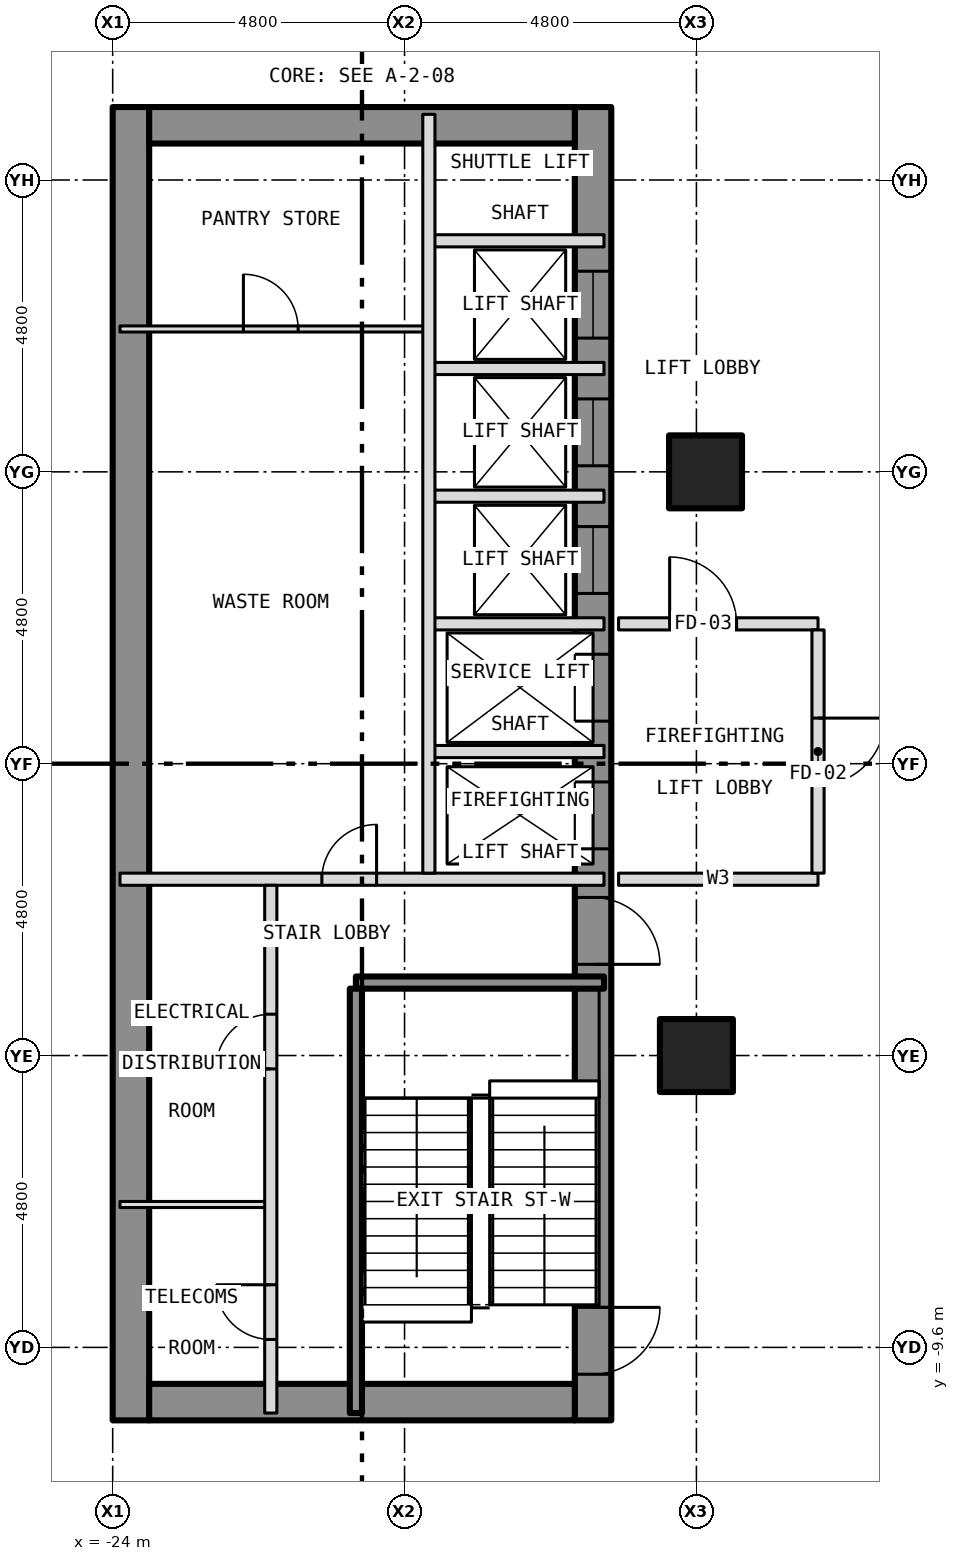
"""IFC4 building model, lengths in metres.
Left out: names, types, materials, properties, quantities, classifications, styles, units other than length and angle.
Written with IfcOpenShell. Run it as: python <this file> out.ifc"""

import sys

from ifc_helpers import new_model, si_unit, direction, frame, frame_2d, origin, origin_2d, place, context, subcontext, project, spatial, rectangle, hollow_rectangle, extrude, element, fill, save


model = new_model("IFC4")
c1 = context("Model", 3, precision=1e-05, world=origin(), true_north=direction((0.0, 1.0)))
c2 = subcontext(c1, "Body", "Model", "MODEL_VIEW")
j1 = project(units=[si_unit("LENGTHUNIT", "METRE"), si_unit("PLANEANGLEUNIT", "RADIAN")], contexts=[c1])
p1 = place(None, origin())
s1 = spatial("IfcSite", under=j1, at=p1, CompositionType="ELEMENT")
p2 = place(p1, origin())
s2 = spatial("IfcBuilding", under=s1, at=p2, CompositionType="ELEMENT")
p3 = place(p2, frame((0.0, 0.0, 29.0)))
s3 = spatial("IfcBuildingStorey", under=s2, at=p3, CompositionType="ELEMENT", Elevation=29.0)
for number, where, z_axis, x_axis in (
    (1, (-14.4, -4.8, -0.2), (0.0, 0.0, 1.0), (1.0, 0.0, 0.0)),
    (2, (-14.25, 4.8, -0.2), (0.0, 0.0, 1.0), (1.0, 0.0, 0.0)),
):
    element("IfcColumn", number, at=place(p3, frame(where, z_axis=z_axis, x_axis=x_axis)), inside=s3, PredefinedType="COLUMN", context=c2, shape_type="SweptSolid", body=[
        extrude(hollow_rectangle(XDim=1.2, YDim=1.2, WallThickness=0.07, at=origin_2d()), origin(), (0.0, 0.0, 1.0), 4.4),
    ])
p4 = place(p3, frame((-16.1, -10.8, 0.0), z_axis=(0.0, 0.0, 1.0), x_axis=(0.0, 1.0, 0.0)))
e3 = element("IfcWall", 3, at=p4, inside=s3, PredefinedType="SHEAR", context=c2, shape_type="SweptSolid", body=[
    extrude(rectangle(XDim=21.6, YDim=0.6, at=frame_2d((10.8, 0.0))), origin(), (0.0, 0.0, 1.0), 3.9),
])
p5 = place(p4, frame((9.4, 0.0, 0.0)))
e4 = element("IfcOpeningElement", 4, at=p5, cuts=e3, PredefinedType="OPENING", context=c2, shape_type="SweptSolid", body=[
    extrude(rectangle(XDim=1.1, YDim=2.1, at=frame_2d((0.55, 1.05))), frame((0.0, 0.312, 0.0), z_axis=(0.0, -1.0, 0.0), x_axis=(1.0, 0.0, 0.0)), (0.0, 0.0, 1.0), 0.624),
])
p6 = place(p4, frame((11.5, 0.0, 0.0)))
e5 = element("IfcOpeningElement", 5, at=p6, cuts=e3, PredefinedType="OPENING", context=c2, shape_type="SweptSolid", body=[
    extrude(rectangle(XDim=1.1, YDim=2.1, at=frame_2d((0.55, 1.05))), frame((0.0, 0.312, 0.0), z_axis=(0.0, -1.0, 0.0), x_axis=(1.0, 0.0, 0.0)), (0.0, 0.0, 1.0), 0.624),
])
p7 = place(p4, frame((13.6, 0.0, 0.0)))
e6 = element("IfcOpeningElement", 6, at=p7, cuts=e3, PredefinedType="OPENING", context=c2, shape_type="SweptSolid", body=[
    extrude(rectangle(XDim=1.1, YDim=2.1, at=frame_2d((0.55, 1.05))), frame((0.0, 0.312, 0.0), z_axis=(0.0, -1.0, 0.0), x_axis=(1.0, 0.0, 0.0)), (0.0, 0.0, 1.0), 0.624),
])
p8 = place(p4, frame((15.7, 0.0, 0.0)))
e7 = element("IfcOpeningElement", 7, at=p8, cuts=e3, PredefinedType="OPENING", context=c2, shape_type="SweptSolid", body=[
    extrude(rectangle(XDim=1.1, YDim=2.1, at=frame_2d((0.55, 1.05))), frame((0.0, 0.312, 0.0), z_axis=(0.0, -1.0, 0.0), x_axis=(1.0, 0.0, 0.0)), (0.0, 0.0, 1.0), 0.624),
])
p9 = place(p4, frame((17.8, 0.0, 0.0)))
e8 = element("IfcOpeningElement", 8, at=p9, cuts=e3, PredefinedType="OPENING", context=c2, shape_type="SweptSolid", body=[
    extrude(rectangle(XDim=1.1, YDim=2.1, at=frame_2d((0.55, 1.05))), frame((0.0, 0.312, 0.0), z_axis=(0.0, -1.0, 0.0), x_axis=(1.0, 0.0, 0.0)), (0.0, 0.0, 1.0), 0.624),
])
p10 = place(p4, frame((0.758, 0.0, 0.0)))
e9 = element("IfcOpeningElement", 9, at=p10, cuts=e3, PredefinedType="OPENING", context=c2, shape_type="SweptSolid", body=[
    extrude(rectangle(XDim=1.1, YDim=2.1, at=frame_2d((0.55, 1.05))), frame((0.0, 0.312, 0.0), z_axis=(0.0, -1.0, 0.0), x_axis=(1.0, 0.0, 0.0)), (0.0, 0.0, 1.0), 0.624),
])
p11 = place(p4, frame((7.5, 0.0, 0.0)))
e10 = element("IfcOpeningElement", 10, at=p11, cuts=e3, PredefinedType="OPENING", context=c2, shape_type="SweptSolid", body=[
    extrude(rectangle(XDim=1.1, YDim=2.1, at=frame_2d((0.55, 1.05))), frame((0.0, 0.312, 0.0), z_axis=(0.0, -1.0, 0.0), x_axis=(1.0, 0.0, 0.0)), (0.0, 0.0, 1.0), 0.624),
])
p12 = place(p3, frame((-23.7, -10.8, 0.0), z_axis=(0.0, 0.0, 1.0), x_axis=(0.0, 1.0, 0.0)))
e11 = element("IfcWall", 11, at=p12, inside=s3, PredefinedType="SHEAR", context=c2, shape_type="SweptSolid", body=[
    extrude(rectangle(XDim=21.6, YDim=0.6, at=frame_2d((10.8, 0.0))), origin(), (0.0, 0.0, 1.0), 3.9),
])
for number, where, z_axis, x_axis in (
    (12, (-23.4, 10.5, 0.0), (0.0, 0.0, 1.0), (1.0, 0.0, 0.0)),
    (13, (-23.4, -10.5, 0.0), (0.0, 0.0, 1.0), (1.0, 0.0, 0.0)),
):
    element("IfcWall", number, at=place(p3, frame(where, z_axis=z_axis, x_axis=x_axis)), inside=s3, PredefinedType="SHEAR", context=c2, shape_type="SweptSolid", body=[
        extrude(rectangle(XDim=7.0, YDim=0.6, at=frame_2d((3.5, 0.0))), origin(), (0.0, 0.0, 1.0), 3.9),
    ])
p13 = place(p3, frame((-23.88, -7.25, 0.0), z_axis=(0.0, 0.0, 1.0), x_axis=(1.0, 0.0, 0.0)))
e14 = element("IfcWall", 14, at=p13, inside=s3, PredefinedType="PARTITIONING", context=c2, shape_type="SweptSolid", body=[
    extrude(rectangle(XDim=2.48, YDim=0.1, at=frame_2d((1.24, 0.0))), origin(), (0.0, 0.0, 1.0), 3.9),
])
p14 = place(p3, frame((-20.0, -3.6, 0.0), z_axis=(0.0, 0.0, 1.0), x_axis=(1.0, 0.0, 0.0)))
e15 = element("IfcWall", 15, at=p14, inside=s3, PredefinedType="SHEAR", context=c2, shape_type="SweptSolid", body=[
    extrude(rectangle(XDim=4.08, YDim=0.2, at=frame_2d((2.04, 0.0))), origin(), (0.0, 0.0, 1.0), 3.9),
])
p15 = place(p3, frame((-23.88, -1.9, 0.0), z_axis=(0.0, 0.0, 1.0), x_axis=(1.0, 0.0, 0.0)))
e16 = element("IfcWall", 16, at=p15, inside=s3, PredefinedType="PARTITIONING", context=c2, shape_type="SweptSolid", body=[
    extrude(rectangle(XDim=7.96, YDim=0.2, at=frame_2d((3.98, 0.0))), origin(), (0.0, 0.0, 1.0), 3.9),
])
p16 = place(p15, frame((3.32, 0.0, 0.0)))
e17 = element("IfcOpeningElement", 17, at=p16, cuts=e16, PredefinedType="OPENING", context=c2, shape_type="SweptSolid", body=[
    extrude(rectangle(XDim=0.9, YDim=2.1, at=frame_2d((0.45, 1.05))), frame((0.0, 0.112, 0.0), z_axis=(0.0, -1.0, 0.0), x_axis=(1.0, 0.0, 0.0)), (0.0, 0.0, 1.0), 0.224),
])
p17 = place(p3, frame((-15.68, -1.9, 0.0), z_axis=(0.0, 0.0, 1.0), x_axis=(1.0, 0.0, 0.0)))
e18 = element("IfcWall", 18, at=p17, inside=s3, PredefinedType="PARTITIONING", context=c2, shape_type="SweptSolid", body=[
    extrude(rectangle(XDim=3.28, YDim=0.2, at=frame_2d((1.64, 0.0))), origin(), (0.0, 0.0, 1.0), 4.2),
])
for number, where, z_axis, x_axis in (
    (19, (-18.8, 0.2, 0.0), (0.0, 0.0, 1.0), (1.0, 0.0, 0.0)),
    (20, (-18.8, 2.3, 0.0), (0.0, 0.0, 1.0), (1.0, 0.0, 0.0)),
):
    element("IfcWall", number, at=place(p3, frame(where, z_axis=z_axis, x_axis=x_axis)), inside=s3, PredefinedType="PARTITIONING", context=c2, shape_type="SweptSolid", body=[
        extrude(rectangle(XDim=2.88, YDim=0.2, at=frame_2d((1.44, 0.0))), origin(), (0.0, 0.0, 1.0), 3.9),
    ])
p18 = place(p3, frame((-15.68, 2.3, 0.0), z_axis=(0.0, 0.0, 1.0), x_axis=(1.0, 0.0, 0.0)))
e21 = element("IfcWall", 21, at=p18, inside=s3, PredefinedType="PARTITIONING", context=c2, shape_type="SweptSolid", body=[
    extrude(rectangle(XDim=3.28, YDim=0.2, at=frame_2d((1.64, 0.0))), origin(), (0.0, 0.0, 1.0), 4.2),
])
p19 = place(p18, frame((0.84, 0.0, 0.0)))
e22 = element("IfcOpeningElement", 22, at=p19, cuts=e21, PredefinedType="OPENING", context=c2, shape_type="SweptSolid", body=[
    extrude(rectangle(XDim=1.1, YDim=2.1, at=frame_2d((0.55, 1.05))), frame((0.0, 0.112, 0.0), z_axis=(0.0, -1.0, 0.0), x_axis=(1.0, 0.0, 0.0)), (0.0, 0.0, 1.0), 0.224),
])
for number, where, z_axis, x_axis in (
    (23, (-18.8, 4.4, 0.0), (0.0, 0.0, 1.0), (1.0, 0.0, 0.0)),
    (24, (-18.8, 6.5, 0.0), (0.0, 0.0, 1.0), (1.0, 0.0, 0.0)),
):
    element("IfcWall", number, at=place(p3, frame(where, z_axis=z_axis, x_axis=x_axis)), inside=s3, PredefinedType="PARTITIONING", context=c2, shape_type="SweptSolid", body=[
        extrude(rectangle(XDim=2.88, YDim=0.2, at=frame_2d((1.44, 0.0))), origin(), (0.0, 0.0, 1.0), 3.9),
    ])
p20 = place(p3, frame((-23.88, 7.15, 0.0), z_axis=(0.0, 0.0, 1.0), x_axis=(1.0, 0.0, 0.0)))
e25 = element("IfcWall", 25, at=p20, inside=s3, PredefinedType="PARTITIONING", context=c2, shape_type="SweptSolid", body=[
    extrude(rectangle(XDim=5.08, YDim=0.1, at=frame_2d((2.54, 0.0))), origin(), (0.0, 0.0, 1.0), 3.9),
])
p21 = place(p20, frame((2.03, 0.0, 0.0)))
e26 = element("IfcOpeningElement", 26, at=p21, cuts=e25, PredefinedType="OPENING", context=c2, shape_type="SweptSolid", body=[
    extrude(rectangle(XDim=0.9, YDim=2.1, at=frame_2d((0.45, 1.05))), frame((0.0, 0.062, 0.0), z_axis=(0.0, -1.0, 0.0), x_axis=(1.0, 0.0, 0.0)), (0.0, 0.0, 1.0), 0.124),
])
p22 = place(p3, frame((-18.8, 8.6, 0.0), z_axis=(0.0, 0.0, 1.0), x_axis=(1.0, 0.0, 0.0)))
e27 = element("IfcWall", 27, at=p22, inside=s3, PredefinedType="PARTITIONING", context=c2, shape_type="SweptSolid", body=[
    extrude(rectangle(XDim=2.88, YDim=0.2, at=frame_2d((1.44, 0.0))), origin(), (0.0, 0.0, 1.0), 3.9),
])
p23 = place(p3, frame((-21.4, -10.68, 0.0), z_axis=(0.0, 0.0, 1.0), x_axis=(0.0, 1.0, 0.0)))
e28 = element("IfcWall", 28, at=p23, inside=s3, PredefinedType="PARTITIONING", context=c2, shape_type="SweptSolid", body=[
    extrude(rectangle(XDim=8.68, YDim=0.2, at=frame_2d((4.34, 0.0))), origin(), (0.0, 0.0, 1.0), 3.9),
])
p24 = place(p23, frame((1.21, 0.0, 0.0)))
e29 = element("IfcOpeningElement", 29, at=p24, cuts=e28, PredefinedType="OPENING", context=c2, shape_type="SweptSolid", body=[
    extrude(rectangle(XDim=0.9, YDim=2.1, at=frame_2d((0.45, 1.05))), frame((0.0, 0.112, 0.0), z_axis=(0.0, -1.0, 0.0), x_axis=(1.0, 0.0, 0.0)), (0.0, 0.0, 1.0), 0.224),
])
p25 = place(p23, frame((5.66, 0.0, 0.0)))
e30 = element("IfcOpeningElement", 30, at=p25, cuts=e28, PredefinedType="OPENING", context=c2, shape_type="SweptSolid", body=[
    extrude(rectangle(XDim=0.9, YDim=2.1, at=frame_2d((0.45, 1.05))), frame((0.0, 0.112, 0.0), z_axis=(0.0, -1.0, 0.0), x_axis=(1.0, 0.0, 0.0)), (0.0, 0.0, 1.0), 0.224),
])
p26 = place(p3, frame((-20.0, -10.68, 0.0), z_axis=(0.0, 0.0, 1.0), x_axis=(0.0, 1.0, 0.0)))
e31 = element("IfcWall", 31, at=p26, inside=s3, PredefinedType="SHEAR", context=c2, shape_type="SweptSolid", body=[
    extrude(rectangle(XDim=6.98, YDim=0.2, at=frame_2d((3.49, 0.0))), origin(), (0.0, 0.0, 1.0), 3.9),
])
p27 = place(p3, frame((-18.8, -1.8, 0.0), z_axis=(0.0, 0.0, 1.0), x_axis=(0.0, 1.0, 0.0)))
e32 = element("IfcWall", 32, at=p27, inside=s3, PredefinedType="PARTITIONING", context=c2, shape_type="SweptSolid", body=[
    extrude(rectangle(XDim=12.48, YDim=0.2, at=frame_2d((6.24, 0.0))), origin(), (0.0, 0.0, 1.0), 3.9),
])
p28 = place(p3, frame((-12.4, -1.8, 0.0), z_axis=(0.0, 0.0, 1.0), x_axis=(0.0, 1.0, 0.0)))
e33 = element("IfcWall", 33, at=p28, inside=s3, PredefinedType="PARTITIONING", context=c2, shape_type="SweptSolid", body=[
    extrude(rectangle(XDim=4.0, YDim=0.2, at=frame_2d((2.0, 0.0))), origin(), (0.0, 0.0, 1.0), 4.2),
])
p29 = place(p28, frame((1.45, 0.0, 0.0)))
e34 = element("IfcOpeningElement", 34, at=p29, cuts=e33, PredefinedType="OPENING", context=c2, shape_type="SweptSolid", body=[
    extrude(rectangle(XDim=1.1, YDim=2.1, at=frame_2d((0.55, 1.05))), frame((0.0, 0.112, 0.0), z_axis=(0.0, -1.0, 0.0), x_axis=(1.0, 0.0, 0.0)), (0.0, 0.0, 1.0), 0.224),
])
p30 = place(p5, origin())
e35 = element("IfcDoor", 35, at=p30, inside=s3, OperationType="SLIDING_TO_LEFT", PredefinedType="DOOR", context=c2, shape_type="SweptSolid", body=[
    extrude(rectangle(XDim=1.1, YDim=2.1, at=frame_2d((0.55, 1.05))), frame((0.0, 0.025, 0.0), z_axis=(0.0, -1.0, 0.0), x_axis=(1.0, 0.0, 0.0)), (0.0, 0.0, 1.0), 0.05),
])
fill(e4, e35)
p31 = place(p6, origin())
e36 = element("IfcDoor", 36, at=p31, inside=s3, OperationType="SLIDING_TO_LEFT", PredefinedType="DOOR", context=c2, shape_type="SweptSolid", body=[
    extrude(rectangle(XDim=1.1, YDim=2.1, at=frame_2d((0.55, 1.05))), frame((0.0, 0.025, 0.0), z_axis=(0.0, -1.0, 0.0), x_axis=(1.0, 0.0, 0.0)), (0.0, 0.0, 1.0), 0.05),
])
fill(e5, e36)
p32 = place(p7, origin())
e37 = element("IfcDoor", 37, at=p32, inside=s3, OperationType="SLIDING_TO_LEFT", PredefinedType="DOOR", context=c2, shape_type="SweptSolid", body=[
    extrude(rectangle(XDim=1.1, YDim=2.1, at=frame_2d((0.55, 1.05))), frame((0.0, 0.025, 0.0), z_axis=(0.0, -1.0, 0.0), x_axis=(1.0, 0.0, 0.0)), (0.0, 0.0, 1.0), 0.05),
])
fill(e6, e37)
p33 = place(p8, origin())
e38 = element("IfcDoor", 38, at=p33, inside=s3, OperationType="SLIDING_TO_LEFT", PredefinedType="DOOR", context=c2, shape_type="SweptSolid", body=[
    extrude(rectangle(XDim=1.1, YDim=2.1, at=frame_2d((0.55, 1.05))), frame((0.0, 0.025, 0.0), z_axis=(0.0, -1.0, 0.0), x_axis=(1.0, 0.0, 0.0)), (0.0, 0.0, 1.0), 0.05),
])
fill(e7, e38)
p34 = place(p9, origin())
e39 = element("IfcDoor", 39, at=p34, inside=s3, OperationType="SLIDING_TO_LEFT", PredefinedType="DOOR", context=c2, shape_type="SweptSolid", body=[
    extrude(rectangle(XDim=1.1, YDim=2.1, at=frame_2d((0.55, 1.05))), frame((0.0, 0.025, 0.0), z_axis=(0.0, -1.0, 0.0), x_axis=(1.0, 0.0, 0.0)), (0.0, 0.0, 1.0), 0.05),
])
fill(e8, e39)
p35 = place(p10, origin())
e40 = element("IfcDoor", 40, at=p35, inside=s3, OperationType="SINGLE_SWING_RIGHT", PredefinedType="DOOR", context=c2, shape_type="SweptSolid", body=[
    extrude(rectangle(XDim=1.1, YDim=2.1, at=frame_2d((0.55, 1.05))), frame((0.0, 0.025, 0.0), z_axis=(0.0, -1.0, 0.0), x_axis=(1.0, 0.0, 0.0)), (0.0, 0.0, 1.0), 0.05),
])
fill(e9, e40)
p36 = place(p11, origin())
e41 = element("IfcDoor", 41, at=p36, inside=s3, OperationType="SINGLE_SWING_LEFT", PredefinedType="DOOR", context=c2, shape_type="SweptSolid", body=[
    extrude(rectangle(XDim=1.1, YDim=2.1, at=frame_2d((0.55, 1.05))), frame((0.0, 0.025, 0.0), z_axis=(0.0, -1.0, 0.0), x_axis=(1.0, 0.0, 0.0)), (0.0, 0.0, 1.0), 0.05),
])
fill(e10, e41)
p37 = place(p24, origin())
e42 = element("IfcDoor", 42, at=p37, inside=s3, OperationType="SINGLE_SWING_RIGHT", PredefinedType="DOOR", context=c2, shape_type="SweptSolid", body=[
    extrude(rectangle(XDim=0.9, YDim=2.1, at=frame_2d((0.45, 1.05))), frame((0.0, 0.025, 0.0), z_axis=(0.0, -1.0, 0.0), x_axis=(1.0, 0.0, 0.0)), (0.0, 0.0, 1.0), 0.05),
])
fill(e29, e42)
p38 = place(p25, origin())
e43 = element("IfcDoor", 43, at=p38, inside=s3, OperationType="SINGLE_SWING_LEFT", PredefinedType="DOOR", context=c2, shape_type="SweptSolid", body=[
    extrude(rectangle(XDim=0.9, YDim=2.1, at=frame_2d((0.45, 1.05))), frame((0.0, 0.025, 0.0), z_axis=(0.0, -1.0, 0.0), x_axis=(1.0, 0.0, 0.0)), (0.0, 0.0, 1.0), 0.05),
])
fill(e30, e43)
p39 = place(p16, origin())
e44 = element("IfcDoor", 44, at=p39, inside=s3, OperationType="SINGLE_SWING_RIGHT", PredefinedType="DOOR", context=c2, shape_type="SweptSolid", body=[
    extrude(rectangle(XDim=0.9, YDim=2.1, at=frame_2d((0.45, 1.05))), frame((0.0, 0.025, 0.0), z_axis=(0.0, -1.0, 0.0), x_axis=(1.0, 0.0, 0.0)), (0.0, 0.0, 1.0), 0.05),
])
fill(e17, e44)
p40 = place(p21, origin())
e45 = element("IfcDoor", 45, at=p40, inside=s3, OperationType="SINGLE_SWING_LEFT", PredefinedType="DOOR", context=c2, shape_type="SweptSolid", body=[
    extrude(rectangle(XDim=0.9, YDim=2.1, at=frame_2d((0.45, 1.05))), frame((0.0, 0.025, 0.0), z_axis=(0.0, -1.0, 0.0), x_axis=(1.0, 0.0, 0.0)), (0.0, 0.0, 1.0), 0.05),
])
fill(e26, e45)
p41 = place(p29, origin())
e46 = element("IfcDoor", 46, at=p41, inside=s3, OperationType="SINGLE_SWING_RIGHT", PredefinedType="DOOR", context=c2, shape_type="SweptSolid", body=[
    extrude(rectangle(XDim=1.1, YDim=2.1, at=frame_2d((0.55, 1.05))), frame((0.0, 0.025, 0.0), z_axis=(0.0, -1.0, 0.0), x_axis=(1.0, 0.0, 0.0)), (0.0, 0.0, 1.0), 0.05),
])
fill(e34, e46)
p42 = place(p19, origin())
e47 = element("IfcDoor", 47, at=p42, inside=s3, OperationType="SINGLE_SWING_LEFT", PredefinedType="DOOR", context=c2, shape_type="SweptSolid", body=[
    extrude(rectangle(XDim=1.1, YDim=2.1, at=frame_2d((0.55, 1.05))), frame((0.0, 0.025, 0.0), z_axis=(0.0, -1.0, 0.0), x_axis=(1.0, 0.0, 0.0)), (0.0, 0.0, 1.0), 0.05),
])
fill(e22, e47)
save(model, sys.argv[1])
